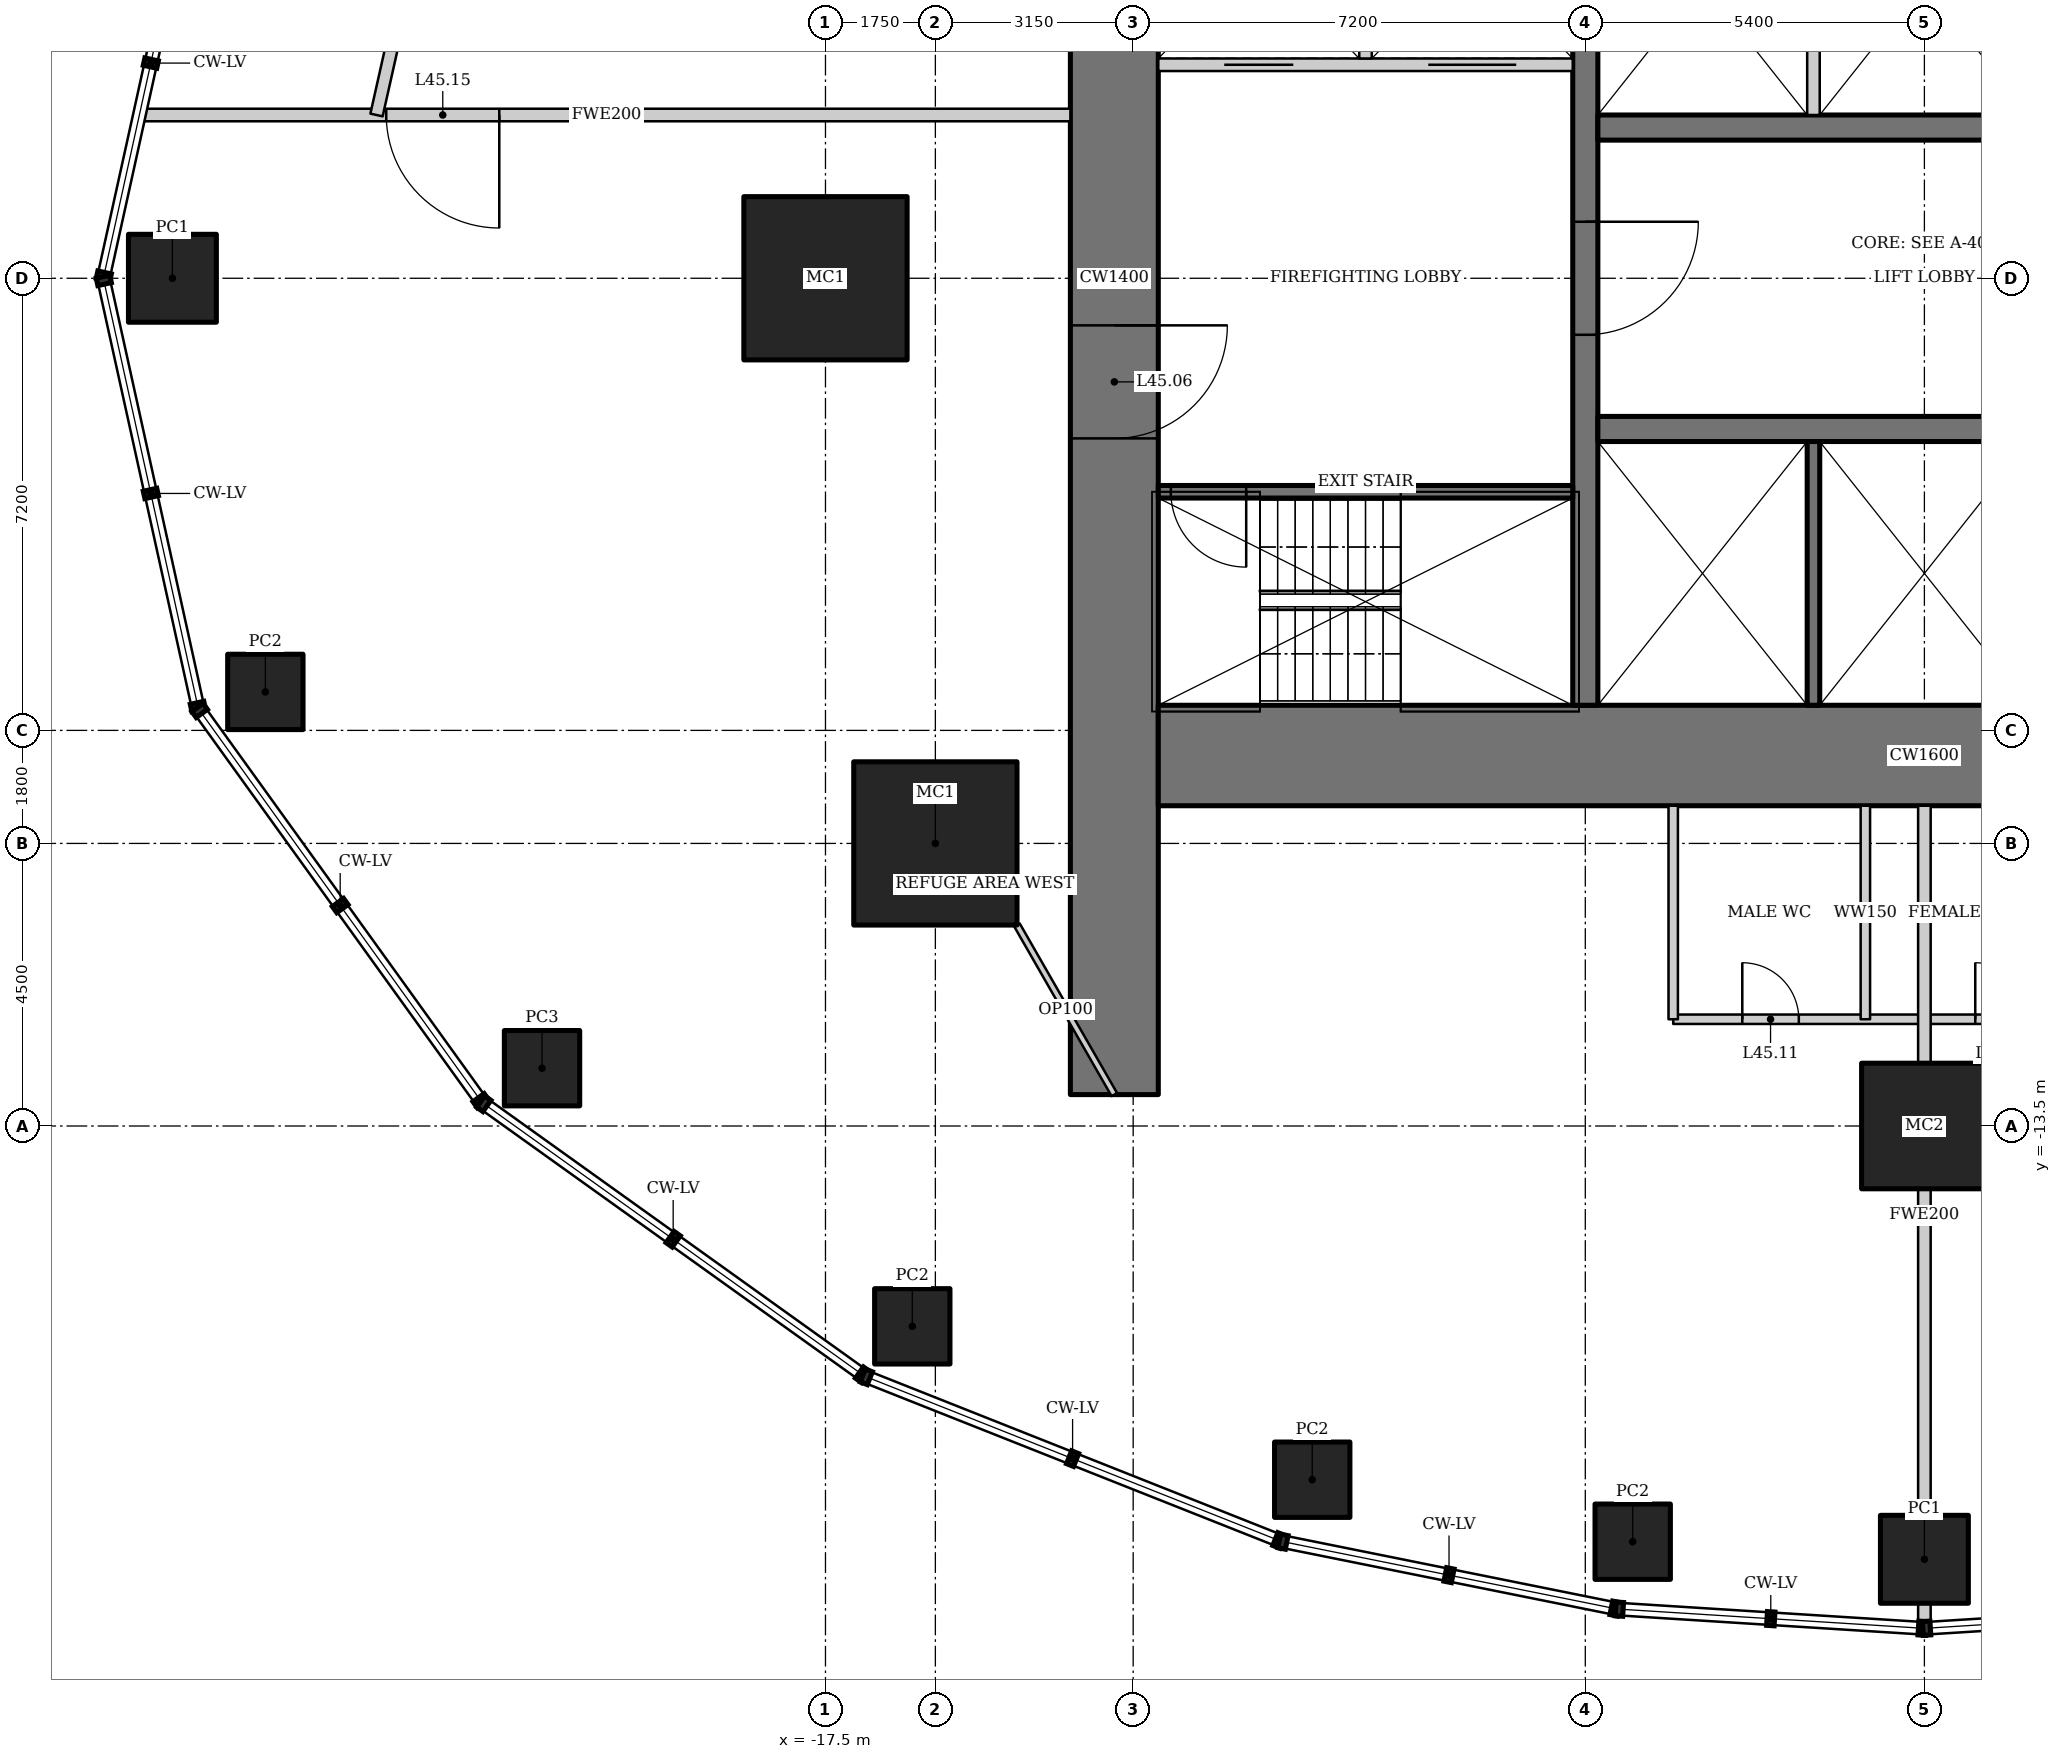
"""IFC4 building model, lengths in metres.
Left out: names, types, materials, properties, quantities, classifications, styles, units other than length and angle.
Written with IfcOpenShell. Run it as: python <this file> out.ifc"""

import sys

from ifc_helpers import new_model, si_unit, direction, frame, frame_2d, origin, origin_2d, place, context, subcontext, project, spatial, rectangle, hollow_rectangle, extrude, element, fill, save


model = new_model("IFC4")
c1 = context("Model", 3, precision=1e-05, world=origin(), true_north=direction((0.0, 1.0)))
c2 = subcontext(c1, "Body", "Model", "MODEL_VIEW")
j1 = project(units=[si_unit("LENGTHUNIT", "METRE"), si_unit("PLANEANGLEUNIT", "RADIAN")], contexts=[c1])
p1 = place(None, origin())
s1 = spatial("IfcSite", under=j1, at=p1, CompositionType="ELEMENT")
p2 = place(p1, origin())
s2 = spatial("IfcBuilding", under=s1, at=p2, CompositionType="ELEMENT")
p3 = place(p2, frame((0.0, 0.0, 193.0)))
s3 = spatial("IfcBuildingStorey", under=s2, at=p3, CompositionType="ELEMENT", Elevation=193.0)
for number, where, z_axis, x_axis in (
    (1, (-17.5, 0.0, 0.0), (0.0, 0.0, 1.0), (1.0, 0.0, 0.0)),
    (2, (-15.75, -9.0, 0.0), (0.0, 0.0, 1.0), (1.0, 0.0, 0.0)),
):
    element("IfcColumn", number, at=place(p3, frame(where, z_axis=z_axis, x_axis=x_axis)), inside=s3, PredefinedType="COLUMN", context=c2, shape_type="SweptSolid", body=[
        extrude(hollow_rectangle(XDim=2.6, YDim=2.6, WallThickness=0.13, at=origin_2d()), origin(), (0.0, 0.0, 1.0), 6.0),
    ])
p4 = place(p3, frame((0.0, -13.5, 0.0), z_axis=(0.0, 0.0, 1.0), x_axis=(1.0, 0.0, 0.0)))
e3 = element("IfcColumn", 3, at=p4, inside=s3, PredefinedType="COLUMN", context=c2, shape_type="SweptSolid", body=[
    extrude(hollow_rectangle(XDim=2.0, YDim=2.0, WallThickness=0.17, at=origin_2d()), origin(), (0.0, 0.0, 1.0), 6.0),
])
p5 = place(p3, frame((-27.9, 0.0, 0.0), z_axis=(0.316203704758, 0.0, 0.948691318131), x_axis=(0.0, 1.0, 0.0)))
e4 = element("IfcColumn", 4, at=p5, inside=s3, PredefinedType="COLUMN", context=c2, shape_type="SweptSolid", body=[
    extrude(hollow_rectangle(XDim=1.4, YDim=1.4, WallThickness=0.1, at=origin_2d()), origin(), (0.0, 0.0, 1.0), 6.088),
])
p6 = place(p3, frame((-26.42, -6.587, 0.0), z_axis=(0.300740657131, 0.074975456692, 0.950754299513), x_axis=(-0.24189877761, 0.970301489946, 0.0)))
e5 = element("IfcColumn", 5, at=p6, inside=s3, PredefinedType="COLUMN", context=c2, shape_type="SweptSolid", body=[
    extrude(hollow_rectangle(XDim=1.2, YDim=1.2, WallThickness=0.1, at=origin_2d()), origin(), (0.0, 0.0, 1.0), 6.112),
])
p7 = place(p3, frame((-22.014, -12.579, 0.0), z_axis=(0.253597337108, 0.144907034473, 0.956394448945), x_axis=(-0.496124150365, 0.868251592238, 0.0)))
e6 = element("IfcColumn", 6, at=p7, inside=s3, PredefinedType="COLUMN", context=c2, shape_type="SweptSolid", body=[
    extrude(hollow_rectangle(XDim=1.2, YDim=1.2, WallThickness=0.12, at=origin_2d()), origin(), (0.0, 0.0, 1.0), 6.087),
])
p8 = place(p3, frame((-16.118, -16.69, 0.0), z_axis=(0.18822591258, 0.194872023339, 0.962598514623), x_axis=(-0.719265676815, 0.69473511942, 0.0)))
e7 = element("IfcColumn", 7, at=p8, inside=s3, PredefinedType="COLUMN", context=c2, shape_type="SweptSolid", body=[
    extrude(hollow_rectangle(XDim=1.2, YDim=1.2, WallThickness=0.1, at=origin_2d()), origin(), (0.0, 0.0, 1.0), 6.061),
])
p9 = place(p3, frame((-9.749, -19.133, 0.0), z_axis=(0.115072645182, 0.225902794668, 0.967329423564), x_axis=(-0.891055307505, 0.45389474437, 0.0)))
e8 = element("IfcColumn", 8, at=p9, inside=s3, PredefinedType="COLUMN", context=c2, shape_type="SweptSolid", body=[
    extrude(hollow_rectangle(XDim=1.2, YDim=1.2, WallThickness=0.1, at=origin_2d()), origin(), (0.0, 0.0, 1.0), 6.042),
])
p10 = place(p3, frame((-4.645, -20.12, 0.0), z_axis=(0.055108290298, 0.23884305259, 0.969493203983), x_axis=(-0.974399541185, 0.224823339843, 0.0)))
e9 = element("IfcColumn", 9, at=p10, inside=s3, PredefinedType="COLUMN", context=c2, shape_type="SweptSolid", body=[
    extrude(hollow_rectangle(XDim=1.2, YDim=1.2, WallThickness=0.1, at=origin_2d()), origin(), (0.0, 0.0, 1.0), 6.034),
])
p11 = place(p3, frame((0.0, -20.4, 0.0), z_axis=(0.0, 0.242535625036, 0.970142500145), x_axis=(-1.0, 0.0, 0.0)))
e10 = element("IfcColumn", 10, at=p11, inside=s3, PredefinedType="COLUMN", context=c2, shape_type="SweptSolid", body=[
    extrude(hollow_rectangle(XDim=1.4, YDim=1.4, WallThickness=0.1, at=origin_2d()), origin(), (0.0, 0.0, 1.0), 6.007),
])
p12 = place(p3, frame((-12.9, 13.0, 0.0), z_axis=(0.0, 0.0, 1.0), x_axis=(0.0, -1.0, 0.0)))
e11 = element("IfcWall", 11, at=p12, inside=s3, PredefinedType="SHEAR", context=c2, shape_type="SweptSolid", body=[
    extrude(rectangle(XDim=26.0, YDim=1.4, at=frame_2d((13.0, 0.0))), origin(), (0.0, 0.0, 1.0), 6.0),
])
p13 = place(p12, frame((13.75, 0.0, 0.0)))
e12 = element("IfcOpeningElement", 12, at=p13, cuts=e11, PredefinedType="OPENING", context=c2, shape_type="SweptSolid", body=[
    extrude(rectangle(XDim=1.8, YDim=2.1, at=frame_2d((0.9, 1.05))), frame((0.0, 0.71, 0.0), z_axis=(0.0, -1.0, 0.0), x_axis=(1.0, 0.0, 0.0)), (0.0, 0.0, 1.0), 1.42),
])
p14 = place(p3, frame((-12.2, -7.6, 0.0), z_axis=(0.0, 0.0, 1.0), x_axis=(1.0, 0.0, 0.0)))
e13 = element("IfcWall", 13, at=p14, inside=s3, PredefinedType="SHEAR", context=c2, shape_type="SweptSolid", body=[
    extrude(rectangle(XDim=24.4, YDim=1.6, at=frame_2d((12.2, 0.0))), origin(), (0.0, 0.0, 1.0), 6.0),
])
p15 = place(p3, frame((-5.4, 6.8, 0.0), z_axis=(0.0, 0.0, 1.0), x_axis=(0.0, -1.0, 0.0)))
e14 = element("IfcWall", 14, at=p15, inside=s3, PredefinedType="SHEAR", context=c2, shape_type="SweptSolid", body=[
    extrude(rectangle(XDim=13.6, YDim=0.4, at=frame_2d((6.8, 0.0))), origin(), (0.0, 0.0, 1.0), 6.0),
])
p16 = place(p15, frame((5.9, 0.0, 0.0)))
e15 = element("IfcOpeningElement", 15, at=p16, cuts=e14, PredefinedType="OPENING", context=c2, shape_type="SweptSolid", body=[
    extrude(rectangle(XDim=1.8, YDim=2.1, at=frame_2d((0.9, 1.05))), frame((0.0, 0.21, 0.0), z_axis=(0.0, -1.0, 0.0), x_axis=(1.0, 0.0, 0.0)), (0.0, 0.0, 1.0), 0.42),
])
p17 = place(p3, frame((-5.2, -2.4, 0.0), z_axis=(0.0, 0.0, 1.0), x_axis=(1.0, 0.0, 0.0)))
e16 = element("IfcWall", 16, at=p17, inside=s3, PredefinedType="SHEAR", context=c2, shape_type="SweptSolid", body=[
    extrude(rectangle(XDim=10.4, YDim=0.4, at=frame_2d((5.2, 0.0))), origin(), (0.0, 0.0, 1.0), 6.0),
])
p18 = place(p3, frame((-1.767, -2.6, 0.0), z_axis=(0.0, 0.0, 1.0), x_axis=(0.0, -1.0, 0.0)))
e17 = element("IfcWall", 17, at=p18, inside=s3, PredefinedType="SOLIDWALL", context=c2, shape_type="SweptSolid", body=[
    extrude(rectangle(XDim=4.2, YDim=0.2, at=frame_2d((2.1, 0.0))), origin(), (0.0, 0.0, 1.0), 6.0),
])
p19 = place(p3, frame((5.2, 2.4, 0.0), z_axis=(0.0, 0.0, 1.0), x_axis=(-1.0, 0.0, 0.0)))
e18 = element("IfcWall", 18, at=p19, inside=s3, PredefinedType="SHEAR", context=c2, shape_type="SweptSolid", body=[
    extrude(rectangle(XDim=10.4, YDim=0.4, at=frame_2d((5.2, 0.0))), origin(), (0.0, 0.0, 1.0), 6.0),
])
p20 = place(p3, frame((-1.767, 2.6, 0.0), z_axis=(0.0, 0.0, 1.0), x_axis=(0.0, 1.0, 0.0)))
e19 = element("IfcWall", 19, at=p20, inside=s3, PredefinedType="SOLIDWALL", context=c2, shape_type="SweptSolid", body=[
    extrude(rectangle(XDim=4.2, YDim=0.2, at=frame_2d((2.1, 0.0))), origin(), (0.0, 0.0, 1.0), 6.0),
])
p21 = place(p3, frame((-5.6, -3.4, 0.0), z_axis=(0.0, 0.0, 1.0), x_axis=(-1.0, 0.0, 0.0)))
e20 = element("IfcWall", 20, at=p21, inside=s3, PredefinedType="SHEAR", context=c2, shape_type="SweptSolid", body=[
    extrude(rectangle(XDim=6.6, YDim=0.2, at=frame_2d((3.3, 0.0))), origin(), (0.0, 0.0, 1.0), 6.0),
])
p22 = place(p21, frame((5.2, 0.0, 0.0)))
e21 = element("IfcOpeningElement", 21, at=p22, cuts=e20, PredefinedType="OPENING", context=c2, shape_type="SweptSolid", body=[
    extrude(rectangle(XDim=1.2, YDim=2.1, at=frame_2d((0.6, 1.05))), frame((0.0, 0.11, 0.0), z_axis=(0.0, -1.0, 0.0), x_axis=(1.0, 0.0, 0.0)), (0.0, 0.0, 1.0), 0.22),
])
p23 = place(p3, frame((-12.2, 3.4, 0.0), z_axis=(0.0, 0.0, 1.0), x_axis=(1.0, 0.0, 0.0)))
e22 = element("IfcWall", 22, at=p23, inside=s3, PredefinedType="SOLIDWALL", context=c2, shape_type="SweptSolid", body=[
    extrude(rectangle(XDim=6.6, YDim=0.2, at=frame_2d((3.3, 0.0))), origin(), (0.0, 0.0, 1.0), 6.0),
])
p24 = place(p23, frame((1.05, 0.0, 0.0)))
e23 = element("IfcOpeningElement", 23, at=p24, cuts=e22, PredefinedType="OPENING", context=c2, shape_type="SweptSolid", body=[
    extrude(rectangle(XDim=1.1, YDim=2.2, at=frame_2d((0.55, 1.1))), frame((0.0, 0.11, 0.0), z_axis=(0.0, -1.0, 0.0), x_axis=(1.0, 0.0, 0.0)), (0.0, 0.0, 1.0), 0.22),
])
p25 = place(p23, frame((4.3, 0.0, 0.0)))
e24 = element("IfcOpeningElement", 24, at=p25, cuts=e22, PredefinedType="OPENING", context=c2, shape_type="SweptSolid", body=[
    extrude(rectangle(XDim=1.4, YDim=2.2, at=frame_2d((0.7, 1.1))), frame((0.0, 0.11, 0.0), z_axis=(0.0, -1.0, 0.0), x_axis=(1.0, 0.0, 0.0)), (0.0, 0.0, 1.0), 0.22),
])
p26 = place(p3, frame((-8.9, 3.5, 0.0), z_axis=(0.0, 0.0, 1.0), x_axis=(0.0, 1.0, 0.0)))
e25 = element("IfcWall", 25, at=p26, inside=s3, PredefinedType="SOLIDWALL", context=c2, shape_type="SweptSolid", body=[
    extrude(rectangle(XDim=3.3, YDim=0.2, at=frame_2d((1.65, 0.0))), origin(), (0.0, 0.0, 1.0), 6.0),
])
p27 = place(p3, frame((-4.0, -11.8, 0.0), z_axis=(0.0, 0.0, 1.0), x_axis=(1.0, 0.0, 0.0)))
e26 = element("IfcWall", 26, at=p27, inside=s3, PredefinedType="SOLIDWALL", context=c2, shape_type="SweptSolid", body=[
    extrude(rectangle(XDim=9.0, YDim=0.15, at=frame_2d((4.5, 0.0))), origin(), (0.0, 0.0, 1.0), 5.85),
])
p28 = place(p27, frame((1.1, 0.0, 0.0)))
e27 = element("IfcOpeningElement", 27, at=p28, cuts=e26, PredefinedType="OPENING", context=c2, shape_type="SweptSolid", body=[
    extrude(rectangle(XDim=0.9, YDim=2.1, at=frame_2d((0.45, 1.05))), frame((0.0, 0.085, 0.0), z_axis=(0.0, -1.0, 0.0), x_axis=(1.0, 0.0, 0.0)), (0.0, 0.0, 1.0), 0.17),
])
p29 = place(p27, frame((4.81, 0.0, 0.0)))
e28 = element("IfcOpeningElement", 28, at=p29, cuts=e26, PredefinedType="OPENING", context=c2, shape_type="SweptSolid", body=[
    extrude(rectangle(XDim=0.9, YDim=2.1, at=frame_2d((0.45, 1.05))), frame((0.0, 0.085, 0.0), z_axis=(0.0, -1.0, 0.0), x_axis=(1.0, 0.0, 0.0)), (0.0, 0.0, 1.0), 0.17),
])
p30 = place(p27, frame((6.47, 0.0, 0.0)))
e29 = element("IfcOpeningElement", 29, at=p30, cuts=e26, PredefinedType="OPENING", context=c2, shape_type="SweptSolid", body=[
    extrude(rectangle(XDim=1.0, YDim=2.1, at=frame_2d((0.5, 1.05))), frame((0.0, 0.085, 0.0), z_axis=(0.0, -1.0, 0.0), x_axis=(1.0, 0.0, 0.0)), (0.0, 0.0, 1.0), 0.17),
])
p31 = place(p27, frame((8.03, 0.0, 0.0)))
e30 = element("IfcOpeningElement", 30, at=p31, cuts=e26, PredefinedType="OPENING", context=c2, shape_type="SweptSolid", body=[
    extrude(rectangle(XDim=0.8, YDim=2.1, at=frame_2d((0.4, 1.05))), frame((0.0, 0.085, 0.0), z_axis=(0.0, -1.0, 0.0), x_axis=(1.0, 0.0, 0.0)), (0.0, 0.0, 1.0), 0.17),
])
for number, where, z_axis, x_axis in (
    (31, (-4.0, -8.4, 0.0), (0.0, 0.0, 1.0), (0.0, -1.0, 0.0)),
    (32, (-0.94, -8.4, 0.0), (0.0, 0.0, 1.0), (0.0, -1.0, 0.0)),
):
    element("IfcWall", number, at=place(p3, frame(where, z_axis=z_axis, x_axis=x_axis)), inside=s3, PredefinedType="SOLIDWALL", context=c2, shape_type="SweptSolid", body=[
        extrude(rectangle(XDim=3.4, YDim=0.15, at=frame_2d((1.7, 0.0))), origin(), (0.0, 0.0, 1.0), 5.85),
    ])
p32 = place(p3, frame((-13.6, 2.6, 0.0), z_axis=(0.0, 0.0, 1.0), x_axis=(-1.0, 0.0, 0.0)))
e33 = element("IfcWall", 33, at=p32, inside=s3, PredefinedType="SOLIDWALL", context=c2, shape_type="SweptSolid", body=[
    extrude(rectangle(XDim=14.77, YDim=0.2, at=frame_2d((7.385, 0.0))), origin(), (0.0, 0.0, 1.0), 5.85),
])
p33 = place(p32, frame((9.095, 0.0, 0.0)))
e34 = element("IfcOpeningElement", 34, at=p33, cuts=e33, PredefinedType="OPENING", context=c2, shape_type="SweptSolid", body=[
    extrude(rectangle(XDim=1.8, YDim=2.1, at=frame_2d((0.9, 1.05))), frame((0.0, 0.11, 0.0), z_axis=(0.0, -1.0, 0.0), x_axis=(1.0, 0.0, 0.0)), (0.0, 0.0, 1.0), 0.22),
])
p34 = place(p3, frame((0.0, -8.4, 0.0), z_axis=(0.0, 0.0, 1.0), x_axis=(0.0, -1.0, 0.0)))
e35 = element("IfcWall", 35, at=p34, inside=s3, PredefinedType="SOLIDWALL", context=c2, shape_type="SweptSolid", body=[
    extrude(rectangle(XDim=13.045, YDim=0.2, at=frame_2d((6.522, 0.0))), origin(), (0.0, 0.0, 1.0), 4.65),
])
p35 = place(p3, frame((-24.65, 2.6, 0.0), z_axis=(0.0, 0.0, 1.0), x_axis=(0.219211589051, 0.975677343811, 0.0)))
e36 = element("IfcWall", 36, at=p35, inside=s3, PredefinedType="SOLIDWALL", context=c2, shape_type="SweptSolid", body=[
    extrude(rectangle(XDim=2.957, YDim=0.2, at=frame_2d((1.479, 0.0))), origin(), (0.0, 0.0, 1.0), 5.85),
])
p36 = place(p3, frame((-12.9, -13.0, 0.0), z_axis=(0.0, 0.0, 1.0), x_axis=(-0.497886086714, 0.867242437071, 0.0)))
e37 = element("IfcWall", 37, at=p36, inside=s3, PredefinedType="PARTITIONING", context=c2, shape_type="SweptSolid", body=[
    extrude(rectangle(XDim=3.113, YDim=0.1, at=frame_2d((1.557, 0.0))), origin(), (0.0, 0.0, 1.0), 5.85),
])
p37 = place(p16, origin())
e38 = element("IfcDoor", 38, at=p37, inside=s3, OperationType="DOUBLE_DOOR_DOUBLE_SWING", PredefinedType="DOOR", context=c2, shape_type="SweptSolid", body=[
    extrude(rectangle(XDim=1.8, YDim=2.1, at=frame_2d((0.9, 1.05))), frame((0.0, 0.025, 0.0), z_axis=(0.0, -1.0, 0.0), x_axis=(1.0, 0.0, 0.0)), (0.0, 0.0, 1.0), 0.05),
])
fill(e15, e38)
p38 = place(p22, origin())
e39 = element("IfcDoor", 39, at=p38, inside=s3, OperationType="SINGLE_SWING_RIGHT", PredefinedType="DOOR", context=c2, shape_type="SweptSolid", body=[
    extrude(rectangle(XDim=1.2, YDim=2.1, at=frame_2d((0.6, 1.05))), frame((0.0, 0.025, 0.0), z_axis=(0.0, -1.0, 0.0), x_axis=(1.0, 0.0, 0.0)), (0.0, 0.0, 1.0), 0.05),
])
fill(e21, e39)
p39 = place(p13, origin())
e40 = element("IfcDoor", 40, at=p39, inside=s3, OperationType="DOUBLE_DOOR_DOUBLE_SWING", PredefinedType="DOOR", context=c2, shape_type="SweptSolid", body=[
    extrude(rectangle(XDim=1.8, YDim=2.1, at=frame_2d((0.9, 1.05))), frame((0.0, 0.025, 0.0), z_axis=(0.0, -1.0, 0.0), x_axis=(1.0, 0.0, 0.0)), (0.0, 0.0, 1.0), 0.05),
])
fill(e12, e40)
p40 = place(p24, origin())
e41 = element("IfcDoor", 41, at=p40, inside=s3, OperationType="DOUBLE_DOOR_SLIDING", PredefinedType="DOOR", context=c2, shape_type="SweptSolid", body=[
    extrude(rectangle(XDim=1.1, YDim=2.2, at=frame_2d((0.55, 1.1))), frame((0.0, 0.025, 0.0), z_axis=(0.0, -1.0, 0.0), x_axis=(1.0, 0.0, 0.0)), (0.0, 0.0, 1.0), 0.05),
])
fill(e23, e41)
p41 = place(p25, origin())
e42 = element("IfcDoor", 42, at=p41, inside=s3, OperationType="DOUBLE_DOOR_SLIDING", PredefinedType="DOOR", context=c2, shape_type="SweptSolid", body=[
    extrude(rectangle(XDim=1.4, YDim=2.2, at=frame_2d((0.7, 1.1))), frame((0.0, 0.025, 0.0), z_axis=(0.0, -1.0, 0.0), x_axis=(1.0, 0.0, 0.0)), (0.0, 0.0, 1.0), 0.05),
])
fill(e24, e42)
p42 = place(p28, origin())
e43 = element("IfcDoor", 43, at=p42, inside=s3, OperationType="SINGLE_SWING_LEFT", PredefinedType="DOOR", context=c2, shape_type="SweptSolid", body=[
    extrude(rectangle(XDim=0.9, YDim=2.1, at=frame_2d((0.45, 1.05))), frame((0.0, 0.025, 0.0), z_axis=(0.0, -1.0, 0.0), x_axis=(1.0, 0.0, 0.0)), (0.0, 0.0, 1.0), 0.05),
])
fill(e27, e43)
p43 = place(p29, origin())
e44 = element("IfcDoor", 44, at=p43, inside=s3, OperationType="SINGLE_SWING_LEFT", PredefinedType="DOOR", context=c2, shape_type="SweptSolid", body=[
    extrude(rectangle(XDim=0.9, YDim=2.1, at=frame_2d((0.45, 1.05))), frame((0.0, 0.025, 0.0), z_axis=(0.0, -1.0, 0.0), x_axis=(1.0, 0.0, 0.0)), (0.0, 0.0, 1.0), 0.05),
])
fill(e28, e44)
p44 = place(p33, origin())
e45 = element("IfcDoor", 45, at=p44, inside=s3, OperationType="DOUBLE_DOOR_DOUBLE_SWING", PredefinedType="DOOR", context=c2, shape_type="SweptSolid", body=[
    extrude(rectangle(XDim=1.8, YDim=2.1, at=frame_2d((0.9, 1.05))), frame((0.0, 0.025, 0.0), z_axis=(0.0, -1.0, 0.0), x_axis=(1.0, 0.0, 0.0)), (0.0, 0.0, 1.0), 0.05),
])
fill(e34, e45)
save(model, sys.argv[1])
